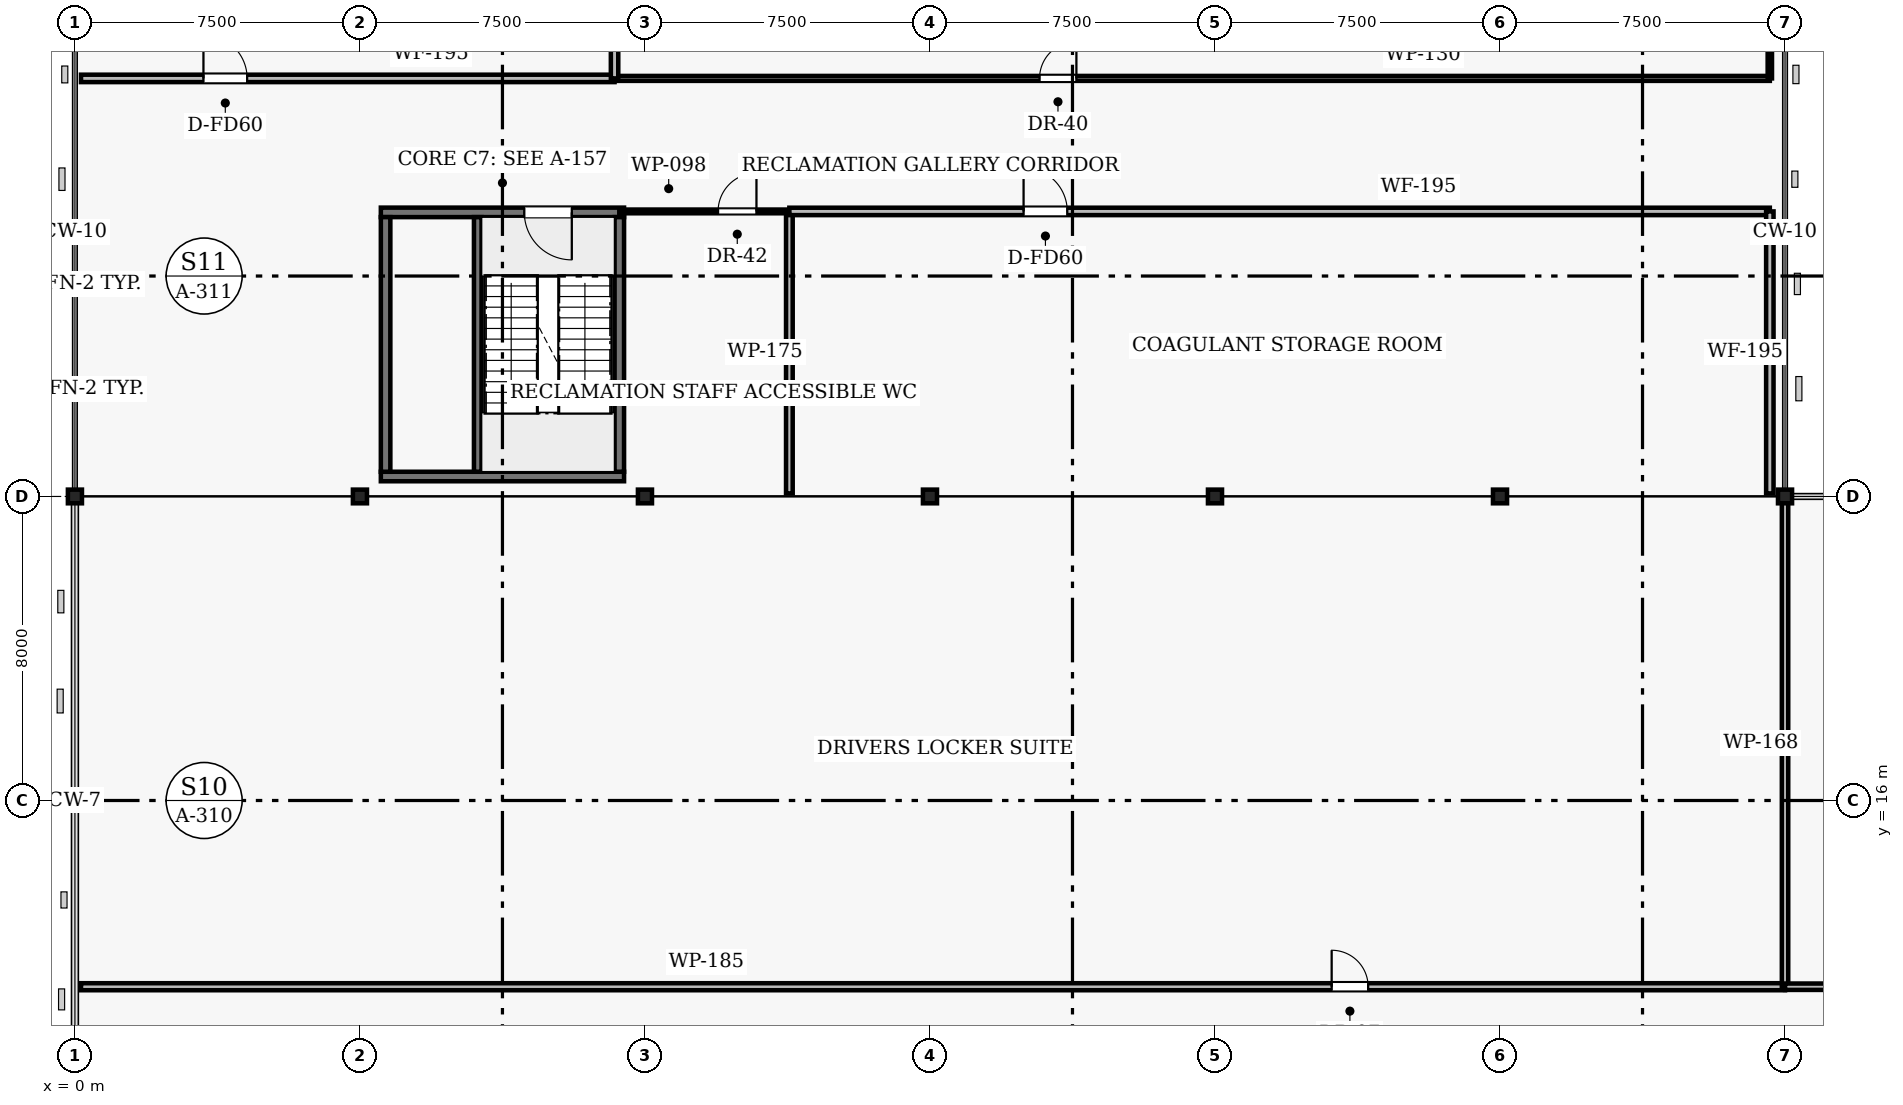
"""IFC4 building model, lengths in metres.
Left out: names, types, materials, properties, quantities, classifications, styles, units other than length and angle.
Written with IfcOpenShell. Run it as: python <this file> out.ifc"""

import sys

from ifc_helpers import new_model, si_unit, direction, frame, frame_2d, origin, origin_2d, place, context, subcontext, project, spatial, rectangle, i_section, extrude, element, fill, save


model = new_model("IFC4")
c1 = context("Model", 3, precision=1e-05, world=origin(), true_north=direction((0.0, 1.0)))
c2 = subcontext(c1, "Body", "Model", "MODEL_VIEW")
j1 = project(units=[si_unit("LENGTHUNIT", "METRE"), si_unit("PLANEANGLEUNIT", "RADIAN")], contexts=[c1])
p1 = place(None, origin())
s1 = spatial("IfcSite", under=j1, at=p1, CompositionType="ELEMENT")
p2 = place(p1, origin())
s2 = spatial("IfcBuilding", under=s1, at=p2, CompositionType="ELEMENT")
p3 = place(p2, frame((0.0, 0.0, 4.5)))
s3 = spatial("IfcBuildingStorey", under=s2, at=p3, CompositionType="ELEMENT", Elevation=4.5)
for number, where, z_axis, x_axis in (
    (1, (0.0, 24.0, 0.0), (0.0, 0.0, 1.0), (1.0, 0.0, 0.0)),
    (2, (7.5, 24.0, 0.0), (0.0, 0.0, 1.0), (1.0, 0.0, 0.0)),
    (3, (15.0, 24.0, 0.0), (0.0, 0.0, 1.0), (1.0, 0.0, 0.0)),
    (4, (22.5, 24.0, 0.0), (0.0, 0.0, 1.0), (1.0, 0.0, 0.0)),
    (5, (30.0, 24.0, 0.0), (0.0, 0.0, 1.0), (1.0, 0.0, 0.0)),
    (6, (37.5, 24.0, 0.0), (0.0, 0.0, 1.0), (1.0, 0.0, 0.0)),
    (7, (45.0, 24.0, 0.0), (0.0, 0.0, 1.0), (1.0, 0.0, 0.0)),
):
    element("IfcColumn", number, at=place(p3, frame(where, z_axis=z_axis, x_axis=x_axis)), inside=s3, PredefinedType="COLUMN", context=c2, shape_type="SweptSolid", body=[
        extrude(i_section(OverallWidth=0.37, OverallDepth=0.36, WebThickness=0.012, FlangeThickness=0.02, FilletRadius=0.015, at=origin_2d()), origin(), (0.0, 0.0, 1.0), 4.28),
    ])
p4 = place(p3, frame((8.05, 24.525, 0.0), z_axis=(0.0, 0.0, 1.0), x_axis=(1.0, 0.0, 0.0)))
e8 = element("IfcWall", 8, at=p4, inside=s3, PredefinedType="SHEAR", context=c2, shape_type="SweptSolid", body=[
    extrude(rectangle(XDim=6.4, YDim=0.25, at=frame_2d((3.2, 0.0))), origin(), (0.0, 0.0, 1.0), 4.5),
])
p5 = place(p3, frame((8.05, 31.475, 0.0), z_axis=(0.0, 0.0, 1.0), x_axis=(1.0, 0.0, 0.0)))
e9 = element("IfcWall", 9, at=p5, inside=s3, PredefinedType="SHEAR", context=c2, shape_type="SweptSolid", body=[
    extrude(rectangle(XDim=6.4, YDim=0.25, at=frame_2d((3.2, 0.0))), origin(), (0.0, 0.0, 1.0), 4.5),
])
p6 = place(p5, frame((3.775, 0.0, 0.0)))
e10 = element("IfcOpeningElement", 10, at=p6, cuts=e9, PredefinedType="OPENING", context=c2, shape_type="SweptSolid", body=[
    extrude(rectangle(XDim=1.25, YDim=2.15, at=frame_2d((0.625, 1.075))), frame((0.0, 0.135, 0.0), z_axis=(0.0, -1.0, 0.0), x_axis=(1.0, 0.0, 0.0)), (0.0, 0.0, 1.0), 0.27),
])
for number, where, z_axis, x_axis in (
    (11, (8.175, 24.65, 0.0), (0.0, 0.0, 1.0), (0.0, 1.0, 0.0)),
    (12, (14.325, 24.65, 0.0), (0.0, 0.0, 1.0), (0.0, 1.0, 0.0)),
):
    element("IfcWall", number, at=place(p3, frame(where, z_axis=z_axis, x_axis=x_axis)), inside=s3, PredefinedType="SHEAR", context=c2, shape_type="SweptSolid", body=[
        extrude(rectangle(XDim=6.7, YDim=0.25, at=frame_2d((3.35, 0.0))), origin(), (0.0, 0.0, 1.0), 4.5),
    ])
p7 = place(p3, frame((10.6, 24.65, 0.0), z_axis=(0.0, 0.0, 1.0), x_axis=(0.0, 1.0, 0.0)))
e13 = element("IfcWall", 13, at=p7, inside=s3, PredefinedType="SHEAR", context=c2, shape_type="SweptSolid", body=[
    extrude(rectangle(XDim=6.7, YDim=0.2, at=frame_2d((3.35, 0.0))), origin(), (0.0, 0.0, 1.0), 4.5),
])
p8 = place(p3, frame((14.2, 35.0, 0.0), z_axis=(0.0, 0.0, 1.0), x_axis=(1.0, 0.0, 0.0)))
e14 = element("IfcWall", 14, at=p8, inside=s3, PredefinedType="PARTITIONING", context=c2, shape_type="SweptSolid", body=[
    extrude(rectangle(XDim=30.4, YDim=0.13, at=frame_2d((15.2, 0.0))), origin(), (0.0, 0.0, 1.0), 3.7),
])
p9 = place(p8, frame((11.183, 0.0, 0.0)))
e15 = element("IfcOpeningElement", 15, at=p9, cuts=e14, PredefinedType="OPENING", context=c2, shape_type="SweptSolid", body=[
    extrude(rectangle(XDim=0.97, YDim=2.18, at=frame_2d((0.485, 1.09))), frame((0.0, 0.075, 0.0), z_axis=(0.0, -1.0, 0.0), x_axis=(1.0, 0.0, 0.0)), (0.0, 0.0, 1.0), 0.15),
])
p10 = place(p3, frame((44.6, 35.0, 0.0), z_axis=(0.0, 0.0, 1.0), x_axis=(0.0, 1.0, 0.0)))
e16 = element("IfcWall", 16, at=p10, inside=s3, PredefinedType="PARTITIONING", context=c2, shape_type="SweptSolid", body=[
    extrude(rectangle(XDim=10.5, YDim=0.114, at=frame_2d((5.25, 0.0))), origin(), (0.0, 0.0, 1.0), 3.613),
])
p11 = place(p3, frame((0.16, 35.0, 0.0), z_axis=(0.0, 0.0, 1.0), x_axis=(1.0, 0.0, 0.0)))
e17 = element("IfcWall", 17, at=p11, inside=s3, PredefinedType="PARTITIONING", context=c2, shape_type="SweptSolid", body=[
    extrude(rectangle(XDim=14.04, YDim=0.195, at=frame_2d((7.02, 0.0))), origin(), (0.0, 0.0, 1.0), 3.7),
])
p12 = place(p11, frame((3.222, 0.0, 0.0)))
e18 = element("IfcOpeningElement", 18, at=p12, cuts=e17, PredefinedType="OPENING", context=c2, shape_type="SweptSolid", body=[
    extrude(rectangle(XDim=1.15, YDim=2.15, at=frame_2d((0.575, 1.075))), frame((0.0, 0.107, 0.0), z_axis=(0.0, -1.0, 0.0), x_axis=(1.0, 0.0, 0.0)), (0.0, 0.0, 1.0), 0.215),
])
p13 = place(p3, frame((14.2, 35.0, 0.0), z_axis=(0.0, 0.0, 1.0), x_axis=(0.0, 1.0, 0.0)))
e19 = element("IfcWall", 19, at=p13, inside=s3, PredefinedType="PARTITIONING", context=c2, shape_type="SweptSolid", body=[
    extrude(rectangle(XDim=10.5, YDim=0.195, at=frame_2d((5.25, 0.0))), origin(), (0.0, 0.0, 1.0), 3.7),
])
p14 = place(p3, frame((14.325, 31.5, 0.0), z_axis=(0.0, 0.0, 1.0), x_axis=(1.0, 0.0, 0.0)))
e20 = element("IfcWall", 20, at=p14, inside=s3, PredefinedType="PARTITIONING", context=c2, shape_type="SweptSolid", body=[
    extrude(rectangle(XDim=4.475, YDim=0.098, at=frame_2d((2.238, 0.0))), origin(), (0.0, 0.0, 1.0), 3.7),
])
p15 = place(p14, frame((2.599, 0.0, 0.0)))
e21 = element("IfcOpeningElement", 21, at=p15, cuts=e20, PredefinedType="OPENING", context=c2, shape_type="SweptSolid", body=[
    extrude(rectangle(XDim=1.01, YDim=2.18, at=frame_2d((0.505, 1.09))), frame((0.0, 0.059, 0.0), z_axis=(0.0, -1.0, 0.0), x_axis=(1.0, 0.0, 0.0)), (0.0, 0.0, 1.0), 0.118),
])
p16 = place(p3, frame((18.8, 24.08, 0.0), z_axis=(0.0, 0.0, 1.0), x_axis=(0.0, 1.0, 0.0)))
e22 = element("IfcWall", 22, at=p16, inside=s3, PredefinedType="PARTITIONING", context=c2, shape_type="SweptSolid", body=[
    extrude(rectangle(XDim=7.42, YDim=0.175, at=frame_2d((3.71, 0.0))), origin(), (0.0, 0.0, 1.0), 3.7),
])
p17 = place(p3, frame((18.8, 31.5, 0.0), z_axis=(0.0, 0.0, 1.0), x_axis=(1.0, 0.0, 0.0)))
e23 = element("IfcWall", 23, at=p17, inside=s3, PredefinedType="PARTITIONING", context=c2, shape_type="SweptSolid", body=[
    extrude(rectangle(XDim=25.8, YDim=0.195, at=frame_2d((12.9, 0.0))), origin(), (0.0, 0.0, 1.0), 3.7),
])
p18 = place(p17, frame((6.163, 0.0, 0.0)))
e24 = element("IfcOpeningElement", 24, at=p18, cuts=e23, PredefinedType="OPENING", context=c2, shape_type="SweptSolid", body=[
    extrude(rectangle(XDim=1.15, YDim=2.15, at=frame_2d((0.575, 1.075))), frame((0.0, 0.107, 0.0), z_axis=(0.0, -1.0, 0.0), x_axis=(1.0, 0.0, 0.0)), (0.0, 0.0, 1.0), 0.215),
])
p19 = place(p3, frame((44.6, 24.08, 0.0), z_axis=(0.0, 0.0, 1.0), x_axis=(0.0, 1.0, 0.0)))
e25 = element("IfcWall", 25, at=p19, inside=s3, PredefinedType="PARTITIONING", context=c2, shape_type="SweptSolid", body=[
    extrude(rectangle(XDim=7.42, YDim=0.195, at=frame_2d((3.71, 0.0))), origin(), (0.0, 0.0, 1.0), 3.613),
])
p20 = place(p3, frame((0.16, 11.1, 0.0), z_axis=(0.0, 0.0, 1.0), x_axis=(1.0, 0.0, 0.0)))
e26 = element("IfcWall", 26, at=p20, inside=s3, PredefinedType="PARTITIONING", context=c2, shape_type="SweptSolid", body=[
    extrude(rectangle(XDim=44.84, YDim=0.185, at=frame_2d((22.42, 0.0))), origin(), (0.0, 0.0, 1.0), 3.7),
])
p21 = place(p20, frame((32.91, 0.0, 0.0)))
e27 = element("IfcOpeningElement", 27, at=p21, cuts=e26, PredefinedType="OPENING", context=c2, shape_type="SweptSolid", body=[
    extrude(rectangle(XDim=0.96, YDim=2.1, at=frame_2d((0.48, 1.05))), frame((0.0, 0.103, 0.0), z_axis=(0.0, -1.0, 0.0), x_axis=(1.0, 0.0, 0.0)), (0.0, 0.0, 1.0), 0.205),
])
p22 = place(p3, frame((45.0, 11.1, 0.0), z_axis=(0.0, 0.0, 1.0), x_axis=(0.0, 1.0, 0.0)))
e28 = element("IfcWall", 28, at=p22, inside=s3, PredefinedType="PARTITIONING", context=c2, shape_type="SweptSolid", body=[
    extrude(rectangle(XDim=12.82, YDim=0.168, at=frame_2d((6.41, 0.0))), origin(), (0.0, 0.0, 1.0), 3.581),
])
p23 = place(p3, frame((45.0, 11.1, 0.0), z_axis=(0.0, 0.0, 1.0), x_axis=(1.0, 0.0, 0.0)))
e29 = element("IfcWall", 29, at=p23, inside=s3, PredefinedType="PARTITIONING", context=c2, shape_type="SweptSolid", body=[
    extrude(rectangle(XDim=44.2, YDim=0.168, at=frame_2d((22.1, 0.0))), origin(), (0.0, 0.0, 1.0), 3.7),
])
p24 = place(p23, frame((10.81, 0.0, 0.0)))
e30 = element("IfcOpeningElement", 30, at=p24, cuts=e29, PredefinedType="OPENING", context=c2, shape_type="SweptSolid", body=[
    extrude(rectangle(XDim=0.96, YDim=2.16, at=frame_2d((0.48, 1.08))), frame((0.0, 0.094, 0.0), z_axis=(0.0, -1.0, 0.0), x_axis=(1.0, 0.0, 0.0)), (0.0, 0.0, 1.0), 0.188),
])
p25 = place(p6, frame((1.25, 0.0, 0.0), z_axis=(0.0, 0.0, 1.0), x_axis=(-1.0, 0.0, 0.0)))
e31 = element("IfcDoor", 31, at=p25, inside=s3, OperationType="SINGLE_SWING_LEFT", PredefinedType="DOOR", context=c2, shape_type="SweptSolid", body=[
    extrude(rectangle(XDim=1.25, YDim=2.15, at=frame_2d((0.625, 1.075))), frame((0.0, 0.025, 0.0), z_axis=(0.0, -1.0, 0.0), x_axis=(1.0, 0.0, 0.0)), (0.0, 0.0, 1.0), 0.05),
])
fill(e10, e31)
p26 = place(p9, origin())
e32 = element("IfcDoor", 32, at=p26, inside=s3, OperationType="SINGLE_SWING_RIGHT", PredefinedType="DOOR", context=c2, shape_type="SweptSolid", body=[
    extrude(rectangle(XDim=0.97, YDim=2.18, at=frame_2d((0.485, 1.09))), frame((0.0, 0.025, 0.0), z_axis=(0.0, -1.0, 0.0), x_axis=(1.0, 0.0, 0.0)), (0.0, 0.0, 1.0), 0.05),
])
fill(e15, e32)
p27 = place(p12, origin())
e33 = element("IfcDoor", 33, at=p27, inside=s3, OperationType="SINGLE_SWING_LEFT", PredefinedType="DOOR", context=c2, shape_type="SweptSolid", body=[
    extrude(rectangle(XDim=1.15, YDim=2.15, at=frame_2d((0.575, 1.075))), frame((0.0, 0.025, 0.0), z_axis=(0.0, -1.0, 0.0), x_axis=(1.0, 0.0, 0.0)), (0.0, 0.0, 1.0), 0.05),
])
fill(e18, e33)
p28 = place(p15, origin())
e34 = element("IfcDoor", 34, at=p28, inside=s3, OperationType="SINGLE_SWING_RIGHT", PredefinedType="DOOR", context=c2, shape_type="SweptSolid", body=[
    extrude(rectangle(XDim=1.01, YDim=2.18, at=frame_2d((0.505, 1.09))), frame((0.0, 0.025, 0.0), z_axis=(0.0, -1.0, 0.0), x_axis=(1.0, 0.0, 0.0)), (0.0, 0.0, 1.0), 0.05),
])
fill(e21, e34)
p29 = place(p18, origin())
e35 = element("IfcDoor", 35, at=p29, inside=s3, OperationType="SINGLE_SWING_LEFT", PredefinedType="DOOR", context=c2, shape_type="SweptSolid", body=[
    extrude(rectangle(XDim=1.15, YDim=2.15, at=frame_2d((0.575, 1.075))), frame((0.0, 0.025, 0.0), z_axis=(0.0, -1.0, 0.0), x_axis=(1.0, 0.0, 0.0)), (0.0, 0.0, 1.0), 0.05),
])
fill(e24, e35)
p30 = place(p21, origin())
e36 = element("IfcDoor", 36, at=p30, inside=s3, OperationType="SINGLE_SWING_LEFT", PredefinedType="DOOR", context=c2, shape_type="SweptSolid", body=[
    extrude(rectangle(XDim=0.96, YDim=2.1, at=frame_2d((0.48, 1.05))), frame((0.0, 0.025, 0.0), z_axis=(0.0, -1.0, 0.0), x_axis=(1.0, 0.0, 0.0)), (0.0, 0.0, 1.0), 0.05),
])
fill(e27, e36)
save(model, sys.argv[1])
